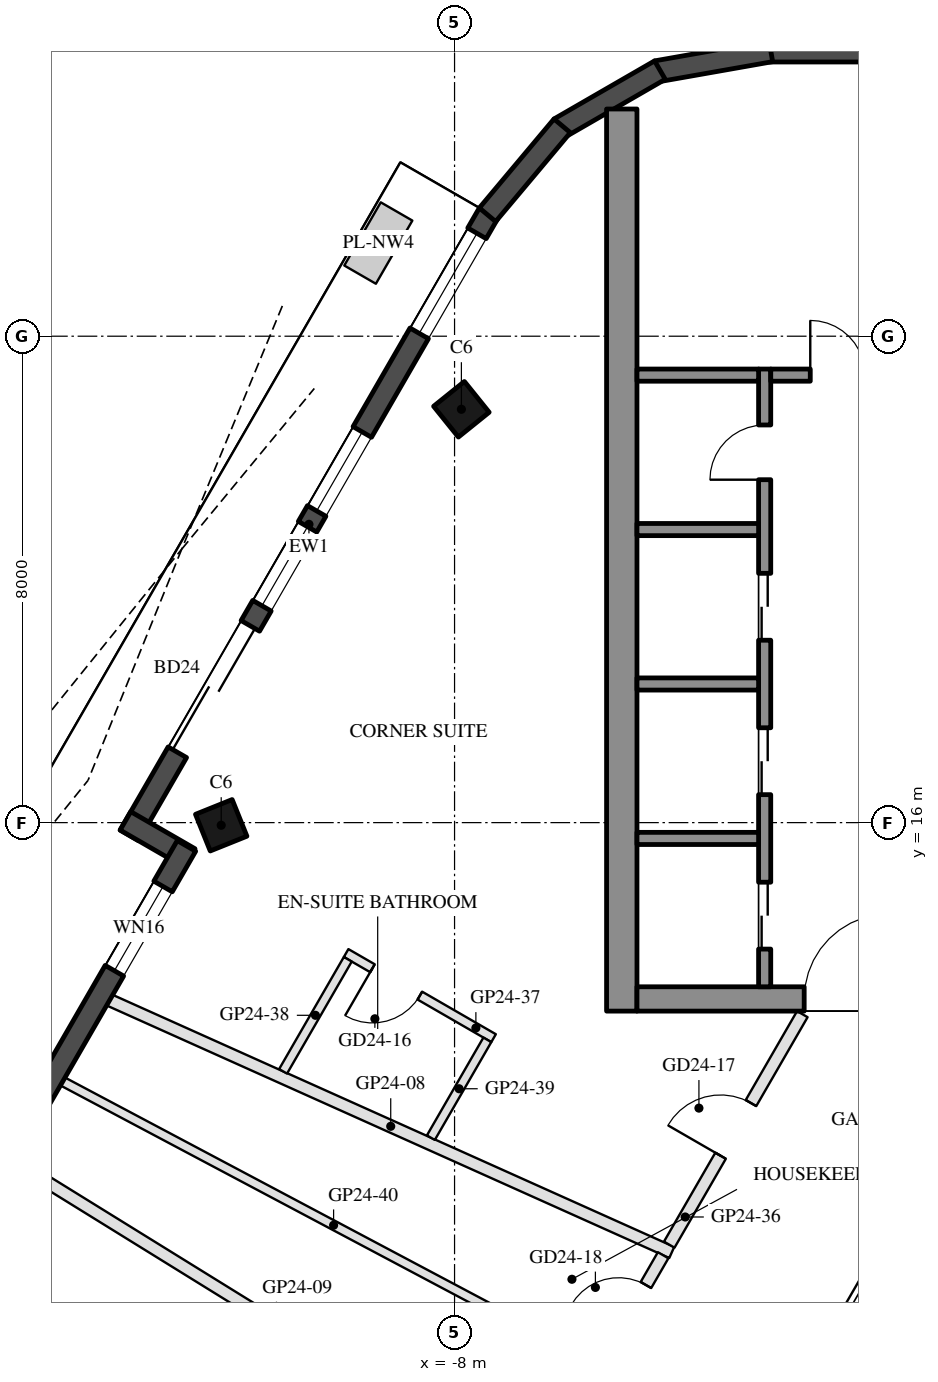
"""IFC4 building model, lengths in metres.
Left out: names, types, materials, properties, quantities, classifications, styles, units other than length and angle.
Written with IfcOpenShell. Run it as: python <this file> out.ifc"""

import sys

from ifc_helpers import new_model, si_unit, direction, frame, frame_2d, origin, origin_2d, place, context, subcontext, project, spatial, rectangle, hollow_rectangle, extrude, boolean, halfspace, element, fill, save


model = new_model("IFC4")
c1 = context("Model", 3, precision=1e-05, world=origin(), true_north=direction((0.0, 1.0)))
c2 = subcontext(c1, "Body", "Model", "MODEL_VIEW")
j1 = project(units=[si_unit("LENGTHUNIT", "METRE"), si_unit("PLANEANGLEUNIT", "RADIAN")], contexts=[c1])
p1 = place(None, origin())
s1 = spatial("IfcSite", under=j1, at=p1, CompositionType="ELEMENT")
p2 = place(p1, origin())
s2 = spatial("IfcBuilding", under=s1, at=p2, CompositionType="ELEMENT")
p3 = place(p2, frame((0.0, 0.0, 254.1)))
s3 = spatial("IfcBuildingStorey", under=s2, at=p3, CompositionType="ELEMENT", Elevation=254.1)
p4 = place(p3, frame((-7.888, 22.798, 0.0), z_axis=(0.069729210429, -0.17998811977, 0.981194228456), x_axis=(0.504065654675, 0.855141098331, 0.121043453862)))
e1 = element("IfcColumn", 1, at=p4, inside=s3, PredefinedType="COLUMN", context=c2, shape_type="SweptSolid", body=[
    boolean("DIFFERENCE", boolean("DIFFERENCE", extrude(hollow_rectangle(XDim=0.65, YDim=0.65, WallThickness=0.03, at=origin_2d()), origin(), (0.0, 0.0, 1.0), 3.771), halfspace(frame((0.0, 0.0, 0.047), z_axis=(0.0, 0.0, 1.0), x_axis=(1.0, 0.0, 0.0)), True)), halfspace(frame((0.0, 0.0, 3.724), z_axis=(0.0, 0.0, 1.0), x_axis=(1.0, 0.0, 0.0)), False)),
])
p5 = place(p3, frame((-11.838, 15.957, 0.0), z_axis=(0.100518021011, -0.128316722417, 0.98662604172), x_axis=(0.503129383785, 0.862065632243, 0.060857775822)))
e2 = element("IfcColumn", 2, at=p5, inside=s3, PredefinedType="COLUMN", context=c2, shape_type="SweptSolid", body=[
    boolean("DIFFERENCE", boolean("DIFFERENCE", extrude(hollow_rectangle(XDim=0.65, YDim=0.65, WallThickness=0.03, at=origin_2d()), origin(), (0.0, 0.0, 1.0), 3.75), halfspace(frame((0.0, 0.0, 0.04), z_axis=(0.0, 0.0, 1.0), x_axis=(1.0, 0.0, 0.0)), True)), halfspace(frame((0.0, 0.0, 3.71), z_axis=(0.0, 0.0, 1.0), x_axis=(1.0, 0.0, 0.0)), False)),
])
p6 = place(p3, frame((-7.441, 26.022, 0.0), z_axis=(0.0, 0.0, 1.0), x_axis=(-0.499992533062, -0.86602971478, 0.0)))
e3 = element("IfcWall", 3, at=p6, inside=s3, PredefinedType="SOLIDWALL", context=c2, shape_type="SweptSolid", body=[
    extrude(rectangle(XDim=11.816, YDim=0.35, at=frame_2d((5.908, 0.0))), origin(), (0.0, 0.0, 1.0), 3.55),
])
p7 = place(p6, frame((0.381, 0.0, 0.3)))
e4 = element("IfcOpeningElement", 4, at=p7, cuts=e3, PredefinedType="OPENING", context=c2, shape_type="SweptSolid", body=[
    extrude(rectangle(XDim=1.9, YDim=2.65, at=frame_2d((0.95, 1.325))), frame((0.0, 0.185, 0.0), z_axis=(0.0, -1.0, 0.0), x_axis=(1.0, 0.0, 0.0)), (0.0, 0.0, 1.0), 0.37),
])
p8 = place(p6, frame((7.836, 0.0, 0.0)))
e5 = element("IfcOpeningElement", 5, at=p8, cuts=e3, PredefinedType="OPENING", context=c2, shape_type="SweptSolid", body=[
    extrude(rectangle(XDim=2.4, YDim=2.4, at=frame_2d((1.2, 1.2))), frame((0.0, 0.185, 0.0), z_axis=(0.0, -1.0, 0.0), x_axis=(1.0, 0.0, 0.0)), (0.0, 0.0, 1.0), 0.37),
])
p9 = place(p6, frame((4.154, 0.0, 0.3)))
e6 = element("IfcOpeningElement", 6, at=p9, cuts=e3, PredefinedType="OPENING", context=c2, shape_type="SweptSolid", body=[
    extrude(rectangle(XDim=1.5, YDim=2.65, at=frame_2d((0.75, 1.325))), frame((0.0, 0.185, 0.0), z_axis=(0.0, -1.0, 0.0), x_axis=(1.0, 0.0, 0.0)), (0.0, 0.0, 1.0), 0.37),
])
p10 = place(p6, frame((5.954, 0.0, 0.3)))
e7 = element("IfcOpeningElement", 7, at=p10, cuts=e3, PredefinedType="OPENING", context=c2, shape_type="SweptSolid", body=[
    extrude(rectangle(XDim=1.5, YDim=2.65, at=frame_2d((0.75, 1.325))), frame((0.0, 0.185, 0.0), z_axis=(0.0, -1.0, 0.0), x_axis=(1.0, 0.0, 0.0)), (0.0, 0.0, 1.0), 0.37),
])
p11 = place(p3, frame((-13.413, 16.029, 0.0), z_axis=(0.0, 0.0, 1.0), x_axis=(0.866005645448, -0.500034220881, 0.0)))
e8 = element("IfcWall", 8, at=p11, inside=s3, PredefinedType="SOLIDWALL", context=c2, shape_type="SweptSolid", body=[
    extrude(rectangle(XDim=1.22, YDim=0.35, at=frame_2d((0.61, 0.0))), origin(), (0.0, 0.0, 1.0), 3.55),
])
p12 = place(p3, frame((-12.409, 15.617, 0.0), z_axis=(0.0, 0.0, 1.0), x_axis=(-0.500003597184, -0.866023326939, 0.0)))
e9 = element("IfcWall", 9, at=p12, inside=s3, PredefinedType="SOLIDWALL", context=c2, shape_type="SweptSolid", body=[
    extrude(rectangle(XDim=6.74, YDim=0.35, at=frame_2d((3.37, 0.0))), origin(), (0.0, 0.0, 1.0), 3.55),
])
p13 = place(p12, frame((0.77, 0.0, 0.3)))
e10 = element("IfcOpeningElement", 10, at=p13, cuts=e9, PredefinedType="OPENING", context=c2, shape_type="SweptSolid", body=[
    extrude(rectangle(XDim=1.6, YDim=2.65, at=frame_2d((0.8, 1.325))), frame((0.0, 0.185, 0.0), z_axis=(0.0, -1.0, 0.0), x_axis=(1.0, 0.0, 0.0)), (0.0, 0.0, 1.0), 0.37),
])
p14 = place(p3, frame((2.829, 28.685, 0.0), z_axis=(0.0, 0.0, 1.0), x_axis=(-1.0, 0.0, 0.0)))
e11 = element("IfcWall", 11, at=p14, inside=s3, PredefinedType="SOLIDWALL", context=c2, shape_type="SweptSolid", body=[
    extrude(rectangle(XDim=5.658, YDim=0.35, at=frame_2d((2.829, 0.0))), origin(), (0.0, 0.0, 1.0), 3.55),
])
for number, where, z_axis, x_axis in (
    (12, (-2.799, 28.688, 0.0), (0.0, 0.0, 1.0), (-0.985, -0.174, 0.0)),
    (13, (-4.623, 28.377, 0.0), (0.0, 0.0, 1.0), (-0.866, -0.5, 0.0)),
):
    element("IfcWall", number, at=place(p3, frame(where, z_axis=z_axis, x_axis=x_axis)), inside=s3, PredefinedType="SOLIDWALL", context=c2, shape_type="SweptSolid", body=[
        extrude(rectangle(XDim=1.91, YDim=0.35, at=frame_2d((0.955, 0.0))), origin(), (0.0, 0.0, 1.0), 3.55),
    ])
p15 = place(p3, frame((-6.23, 27.461, 0.0), z_axis=(0.0, 0.0, 1.0), x_axis=(-0.642808304945, -0.766027077259, 0.0)))
e14 = element("IfcWall", 14, at=p15, inside=s3, PredefinedType="SOLIDWALL", context=c2, shape_type="SweptSolid", body=[
    extrude(rectangle(XDim=1.91, YDim=0.35, at=frame_2d((0.955, 0.0))), origin(), (0.0, 0.0, 1.0), 3.55),
])
p16 = place(p3, frame((-5.25, 12.9, 0.0), z_axis=(0.0, 0.0, 1.0), x_axis=(0.0, 1.0, 0.0)))
e15 = element("IfcWall", 15, at=p16, inside=s3, PredefinedType="SHEAR", context=c2, shape_type="SweptSolid", body=[
    extrude(rectangle(XDim=14.837, YDim=0.5, at=frame_2d((7.418, 0.0))), origin(), (0.0, 0.0, 1.0), 3.5),
])
p17 = place(p3, frame((5.0, 13.1, 0.0), z_axis=(0.0, 0.0, 1.0), x_axis=(-1.0, 0.0, 0.0)))
e16 = element("IfcWall", 16, at=p17, inside=s3, PredefinedType="SHEAR", context=c2, shape_type="SweptSolid", body=[
    extrude(rectangle(XDim=10.0, YDim=0.4, at=frame_2d((5.0, 0.0))), origin(), (0.0, 0.0, 1.0), 3.5),
])
p18 = place(p17, frame((3.55, 0.0, 0.0)))
e17 = element("IfcOpeningElement", 17, at=p18, cuts=e16, PredefinedType="OPENING", context=c2, shape_type="SweptSolid", body=[
    extrude(rectangle(XDim=1.1, YDim=2.1, at=frame_2d((0.55, 1.05))), frame((0.0, 0.21, 0.0), z_axis=(0.0, -1.0, 0.0), x_axis=(1.0, 0.0, 0.0)), (0.0, 0.0, 1.0), 0.42),
])
p19 = place(p17, frame((5.85, 0.0, 0.0)))
e18 = element("IfcOpeningElement", 18, at=p19, cuts=e16, PredefinedType="OPENING", context=c2, shape_type="SweptSolid", body=[
    extrude(rectangle(XDim=1.4, YDim=2.1, at=frame_2d((0.7, 1.05))), frame((0.0, 0.21, 0.0), z_axis=(0.0, -1.0, 0.0), x_axis=(1.0, 0.0, 0.0)), (0.0, 0.0, 1.0), 0.42),
])
p20 = place(p3, frame((-2.9, 13.3, 0.0), z_axis=(0.0, 0.0, 1.0), x_axis=(0.0, 1.0, 0.0)))
e19 = element("IfcWall", 19, at=p20, inside=s3, PredefinedType="SHEAR", context=c2, shape_type="SweptSolid", body=[
    extrude(rectangle(XDim=10.16, YDim=0.2, at=frame_2d((5.08, 0.0))), origin(), (0.0, 0.0, 1.0), 3.5),
])
p21 = place(p20, frame((0.62, 0.0, 0.0)))
e20 = element("IfcOpeningElement", 20, at=p21, cuts=e19, PredefinedType="OPENING", context=c2, shape_type="SweptSolid", body=[
    extrude(rectangle(XDim=1.1, YDim=2.1, at=frame_2d((0.55, 1.05))), frame((0.0, 0.11, 0.0), z_axis=(0.0, -1.0, 0.0), x_axis=(1.0, 0.0, 0.0)), (0.0, 0.0, 1.0), 0.22),
])
p22 = place(p20, frame((3.16, 0.0, 0.0)))
e21 = element("IfcOpeningElement", 21, at=p22, cuts=e19, PredefinedType="OPENING", context=c2, shape_type="SweptSolid", body=[
    extrude(rectangle(XDim=1.1, YDim=2.1, at=frame_2d((0.55, 1.05))), frame((0.0, 0.11, 0.0), z_axis=(0.0, -1.0, 0.0), x_axis=(1.0, 0.0, 0.0)), (0.0, 0.0, 1.0), 0.22),
])
p23 = place(p20, frame((5.7, 0.0, 0.0)))
e22 = element("IfcOpeningElement", 22, at=p23, cuts=e19, PredefinedType="OPENING", context=c2, shape_type="SweptSolid", body=[
    extrude(rectangle(XDim=1.1, YDim=2.1, at=frame_2d((0.55, 1.05))), frame((0.0, 0.11, 0.0), z_axis=(0.0, -1.0, 0.0), x_axis=(1.0, 0.0, 0.0)), (0.0, 0.0, 1.0), 0.22),
])
p24 = place(p20, frame((8.34, 0.0, 0.0)))
e23 = element("IfcOpeningElement", 23, at=p24, cuts=e19, PredefinedType="OPENING", context=c2, shape_type="SweptSolid", body=[
    extrude(rectangle(XDim=0.9, YDim=2.1, at=frame_2d((0.45, 1.05))), frame((0.0, 0.11, 0.0), z_axis=(0.0, -1.0, 0.0), x_axis=(1.0, 0.0, 0.0)), (0.0, 0.0, 1.0), 0.22),
])
p25 = place(p3, frame((-0.4, 23.36, 0.0), z_axis=(0.0, 0.0, 1.0), x_axis=(-1.0, 0.0, 0.0)))
e24 = element("IfcWall", 24, at=p25, inside=s3, PredefinedType="SHEAR", context=c2, shape_type="SweptSolid", body=[
    extrude(rectangle(XDim=2.4, YDim=0.2, at=frame_2d((1.2, 0.0))), origin(), (0.0, 0.0, 1.0), 3.5),
])
p26 = place(p25, frame((0.85, 0.0, 0.0)))
e25 = element("IfcOpeningElement", 25, at=p26, cuts=e24, PredefinedType="OPENING", context=c2, shape_type="SweptSolid", body=[
    extrude(rectangle(XDim=0.9, YDim=2.1, at=frame_2d((0.45, 1.05))), frame((0.0, 0.11, 0.0), z_axis=(0.0, -1.0, 0.0), x_axis=(1.0, 0.0, 0.0)), (0.0, 0.0, 1.0), 0.22),
])
for number, where, z_axis, x_axis in (
    (26, (-3.0, 15.74, 0.0), (0.0, 0.0, 1.0), (-1.0, 0.0, 0.0)),
    (27, (-3.0, 18.28, 0.0), (0.0, 0.0, 1.0), (-1.0, 0.0, 0.0)),
    (28, (-3.0, 20.82, 0.0), (0.0, 0.0, 1.0), (-1.0, 0.0, 0.0)),
    (29, (-3.0, 23.36, 0.0), (0.0, 0.0, 1.0), (-1.0, 0.0, 0.0)),
):
    element("IfcWall", number, at=place(p3, frame(where, z_axis=z_axis, x_axis=x_axis)), inside=s3, PredefinedType="SHEAR", context=c2, shape_type="SweptSolid", body=[
        extrude(rectangle(XDim=2.0, YDim=0.2, at=frame_2d((1.0, 0.0))), origin(), (0.0, 0.0, 1.0), 3.5),
    ])
p27 = place(p3, frame((-13.672, 13.08, 0.0), z_axis=(0.0, 0.0, 1.0), x_axis=(0.912311972773, -0.409495866077, 0.0)))
e30 = element("IfcWall", 30, at=p27, inside=s3, PredefinedType="PARTITIONING", context=c2, shape_type="SweptSolid", body=[
    extrude(rectangle(XDim=10.132, YDim=0.2, at=frame_2d((5.066, 0.0))), origin(), (0.0, 0.0, 1.0), 3.1),
])
p28 = place(p3, frame((-15.216, 10.405, 0.0), z_axis=(0.0, 0.0, 1.0), x_axis=(0.85032395783, -0.52625960014, 0.0)))
e31 = element("IfcWall", 31, at=p28, inside=s3, PredefinedType="PARTITIONING", context=c2, shape_type="SweptSolid", body=[
    extrude(rectangle(XDim=10.085, YDim=0.2, at=frame_2d((5.042, 0.0))), origin(), (0.0, 0.0, 1.0), 3.1),
])
p29 = place(p3, frame((-4.469, 9.059, 0.0), z_axis=(0.0, 0.0, 1.0), x_axis=(0.499996027077, 0.86602769754, 0.0)))
e32 = element("IfcWall", 32, at=p29, inside=s3, PredefinedType="PARTITIONING", context=c2, shape_type="SweptSolid", body=[
    extrude(rectangle(XDim=4.377, YDim=0.2, at=frame_2d((2.189, 0.0))), origin(), (0.0, 0.0, 1.0), 3.0),
])
p30 = place(p29, frame((1.689, 0.0, 0.0)))
e33 = element("IfcOpeningElement", 33, at=p30, cuts=e32, PredefinedType="OPENING", context=c2, shape_type="SweptSolid", body=[
    extrude(rectangle(XDim=1.0, YDim=2.1, at=frame_2d((0.5, 1.05))), frame((0.0, 0.11, 0.0), z_axis=(0.0, -1.0, 0.0), x_axis=(1.0, 0.0, 0.0)), (0.0, 0.0, 1.0), 0.22),
])
p31 = place(p3, frame((-7.358, 12.455, 0.0), z_axis=(0.0, 0.0, 1.0), x_axis=(-0.866034573852, 0.49998411664, 0.0)))
e34 = element("IfcWall", 34, at=p31, inside=s3, PredefinedType="PARTITIONING", context=c2, shape_type="SweptSolid", body=[
    extrude(rectangle(XDim=2.8, YDim=0.15, at=frame_2d((1.4, 0.0))), origin(), (0.0, 0.0, 1.0), 3.55),
])
p32 = place(p31, frame((1.4, 0.0, 0.0)))
e35 = element("IfcOpeningElement", 35, at=p32, cuts=e34, PredefinedType="OPENING", context=c2, shape_type="SweptSolid", body=[
    extrude(rectangle(XDim=0.9, YDim=2.1, at=frame_2d((0.45, 1.05))), frame((0.0, 0.085, 0.0), z_axis=(0.0, -1.0, 0.0), x_axis=(1.0, 0.0, 0.0)), (0.0, 0.0, 1.0), 0.17),
])
p33 = place(p3, frame((-9.756, 13.752, 0.0), z_axis=(0.0, 0.0, 1.0), x_axis=(-0.50001378257, -0.866017446268, 0.0)))
e36 = element("IfcWall", 36, at=p33, inside=s3, PredefinedType="PARTITIONING", context=c2, shape_type="SweptSolid", body=[
    extrude(rectangle(XDim=2.128, YDim=0.15, at=frame_2d((1.064, 0.0))), origin(), (0.0, 0.0, 1.0), 3.55),
])
p34 = place(p3, frame((-7.461, 12.427, 0.0), z_axis=(0.0, 0.0, 1.0), x_axis=(-0.500025795397, -0.866010510293, 0.0)))
e37 = element("IfcWall", 37, at=p34, inside=s3, PredefinedType="PARTITIONING", context=c2, shape_type="SweptSolid", body=[
    extrude(rectangle(XDim=1.858, YDim=0.15, at=frame_2d((0.929, 0.0))), origin(), (0.0, 0.0, 1.0), 3.55),
])
p35 = place(p3, frame((-14.444, 11.742, 0.0), z_axis=(0.0, 0.0, 1.0), x_axis=(0.88333061271, -0.468750497225, 0.0)))
e38 = element("IfcWall", 38, at=p35, inside=s3, PredefinedType="PARTITIONING", context=c2, shape_type="SweptSolid", body=[
    extrude(rectangle(XDim=10.086, YDim=0.15, at=frame_2d((5.043, 0.0))), origin(), (0.0, 0.0, 1.0), 3.1),
])
p36 = place(p3, frame((-5.585, 7.126, 0.0), z_axis=(0.0, 0.0, 1.0), x_axis=(0.499927092639, 0.866067492777, 0.0)))
e39 = element("IfcWall", 39, at=p36, inside=s3, PredefinedType="PARTITIONING", context=c2, shape_type="SweptSolid", body=[
    extrude(rectangle(XDim=2.031, YDim=0.2, at=frame_2d((1.016, 0.0))), origin(), (0.0, 0.0, 1.0), 3.0),
])
p37 = place(p36, frame((0.566, 0.0, 0.0)))
e40 = element("IfcOpeningElement", 40, at=p37, cuts=e39, PredefinedType="OPENING", context=c2, shape_type="SweptSolid", body=[
    extrude(rectangle(XDim=0.9, YDim=2.1, at=frame_2d((0.45, 1.05))), frame((0.0, 0.11, 0.0), z_axis=(0.0, -1.0, 0.0), x_axis=(1.0, 0.0, 0.0)), (0.0, 0.0, 1.0), 0.22),
])
p38 = place(p7, origin())
e41 = element("IfcWindow", 41, at=p38, inside=s3, PartitioningType="SINGLE_PANEL", PredefinedType="WINDOW", context=c2, shape_type="SweptSolid", body=[
    extrude(rectangle(XDim=1.9, YDim=2.65, at=frame_2d((0.95, 1.325))), frame((0.0, 0.03, 0.0), z_axis=(0.0, -1.0, 0.0), x_axis=(1.0, 0.0, 0.0)), (0.0, 0.0, 1.0), 0.06),
])
fill(e4, e41)
p39 = place(p8, frame((2.4, 0.0, 0.0), z_axis=(0.0, 0.0, 1.0), x_axis=(-1.0, 0.0, 0.0)))
e42 = element("IfcDoor", 42, at=p39, inside=s3, OperationType="SLIDING_TO_LEFT", PredefinedType="DOOR", context=c2, shape_type="SweptSolid", body=[
    extrude(rectangle(XDim=2.4, YDim=2.4, at=frame_2d((1.2, 1.2))), frame((0.0, 0.025, 0.0), z_axis=(0.0, -1.0, 0.0), x_axis=(1.0, 0.0, 0.0)), (0.0, 0.0, 1.0), 0.05),
])
fill(e5, e42)
p40 = place(p9, origin())
e43 = element("IfcWindow", 43, at=p40, inside=s3, PartitioningType="SINGLE_PANEL", PredefinedType="WINDOW", context=c2, shape_type="SweptSolid", body=[
    extrude(rectangle(XDim=1.5, YDim=2.65, at=frame_2d((0.75, 1.325))), frame((0.0, 0.03, 0.0), z_axis=(0.0, -1.0, 0.0), x_axis=(1.0, 0.0, 0.0)), (0.0, 0.0, 1.0), 0.06),
])
fill(e6, e43)
p41 = place(p10, origin())
e44 = element("IfcWindow", 44, at=p41, inside=s3, PartitioningType="SINGLE_PANEL", PredefinedType="WINDOW", context=c2, shape_type="SweptSolid", body=[
    extrude(rectangle(XDim=1.5, YDim=2.65, at=frame_2d((0.75, 1.325))), frame((0.0, 0.03, 0.0), z_axis=(0.0, -1.0, 0.0), x_axis=(1.0, 0.0, 0.0)), (0.0, 0.0, 1.0), 0.06),
])
fill(e7, e44)
p42 = place(p13, origin())
e45 = element("IfcWindow", 45, at=p42, inside=s3, PartitioningType="SINGLE_PANEL", PredefinedType="WINDOW", context=c2, shape_type="SweptSolid", body=[
    extrude(rectangle(XDim=1.6, YDim=2.65, at=frame_2d((0.8, 1.325))), frame((0.0, 0.03, 0.0), z_axis=(0.0, -1.0, 0.0), x_axis=(1.0, 0.0, 0.0)), (0.0, 0.0, 1.0), 0.06),
])
fill(e10, e45)
p43 = place(p21, origin())
e46 = element("IfcDoor", 46, at=p43, inside=s3, OperationType="DOUBLE_DOOR_SLIDING", PredefinedType="DOOR", context=c2, shape_type="SweptSolid", body=[
    extrude(rectangle(XDim=1.1, YDim=2.1, at=frame_2d((0.55, 1.05))), frame((0.0, 0.025, 0.0), z_axis=(0.0, -1.0, 0.0), x_axis=(1.0, 0.0, 0.0)), (0.0, 0.0, 1.0), 0.05),
])
fill(e20, e46)
p44 = place(p22, origin())
e47 = element("IfcDoor", 47, at=p44, inside=s3, OperationType="DOUBLE_DOOR_SLIDING", PredefinedType="DOOR", context=c2, shape_type="SweptSolid", body=[
    extrude(rectangle(XDim=1.1, YDim=2.1, at=frame_2d((0.55, 1.05))), frame((0.0, 0.025, 0.0), z_axis=(0.0, -1.0, 0.0), x_axis=(1.0, 0.0, 0.0)), (0.0, 0.0, 1.0), 0.05),
])
fill(e21, e47)
p45 = place(p23, origin())
e48 = element("IfcDoor", 48, at=p45, inside=s3, OperationType="DOUBLE_DOOR_SLIDING", PredefinedType="DOOR", context=c2, shape_type="SweptSolid", body=[
    extrude(rectangle(XDim=1.1, YDim=2.1, at=frame_2d((0.55, 1.05))), frame((0.0, 0.025, 0.0), z_axis=(0.0, -1.0, 0.0), x_axis=(1.0, 0.0, 0.0)), (0.0, 0.0, 1.0), 0.05),
])
fill(e22, e48)
p46 = place(p24, origin())
e49 = element("IfcDoor", 49, at=p46, inside=s3, OperationType="SINGLE_SWING_LEFT", PredefinedType="DOOR", context=c2, shape_type="SweptSolid", body=[
    extrude(rectangle(XDim=0.9, YDim=2.1, at=frame_2d((0.45, 1.05))), frame((0.0, 0.025, 0.0), z_axis=(0.0, -1.0, 0.0), x_axis=(1.0, 0.0, 0.0)), (0.0, 0.0, 1.0), 0.05),
])
fill(e23, e49)
p47 = place(p26, frame((0.9, 0.0, 0.0), z_axis=(0.0, 0.0, 1.0), x_axis=(-1.0, 0.0, 0.0)))
e50 = element("IfcDoor", 50, at=p47, inside=s3, OperationType="SINGLE_SWING_LEFT", PredefinedType="DOOR", context=c2, shape_type="SweptSolid", body=[
    extrude(rectangle(XDim=0.9, YDim=2.1, at=frame_2d((0.45, 1.05))), frame((0.0, 0.025, 0.0), z_axis=(0.0, -1.0, 0.0), x_axis=(1.0, 0.0, 0.0)), (0.0, 0.0, 1.0), 0.05),
])
fill(e25, e50)
p48 = place(p19, frame((1.4, 0.0, 0.0), z_axis=(0.0, 0.0, 1.0), x_axis=(-1.0, 0.0, 0.0)))
e51 = element("IfcDoor", 51, at=p48, inside=s3, OperationType="DOUBLE_DOOR_SINGLE_SWING", PredefinedType="DOOR", context=c2, shape_type="SweptSolid", body=[
    extrude(rectangle(XDim=1.4, YDim=2.1, at=frame_2d((0.7, 1.05))), frame((0.0, 0.025, 0.0), z_axis=(0.0, -1.0, 0.0), x_axis=(1.0, 0.0, 0.0)), (0.0, 0.0, 1.0), 0.05),
])
fill(e18, e51)
p49 = place(p32, origin())
e52 = element("IfcDoor", 52, at=p49, inside=s3, OperationType="SINGLE_SWING_RIGHT", PredefinedType="DOOR", context=c2, shape_type="SweptSolid", body=[
    extrude(rectangle(XDim=0.9, YDim=2.1, at=frame_2d((0.45, 1.05))), frame((0.0, 0.025, 0.0), z_axis=(0.0, -1.0, 0.0), x_axis=(1.0, 0.0, 0.0)), (0.0, 0.0, 1.0), 0.05),
])
fill(e35, e52)
p50 = place(p30, origin())
e53 = element("IfcDoor", 53, at=p50, inside=s3, OperationType="SINGLE_SWING_LEFT", PredefinedType="DOOR", context=c2, shape_type="SweptSolid", body=[
    extrude(rectangle(XDim=1.0, YDim=2.1, at=frame_2d((0.5, 1.05))), frame((0.0, 0.025, 0.0), z_axis=(0.0, -1.0, 0.0), x_axis=(1.0, 0.0, 0.0)), (0.0, 0.0, 1.0), 0.05),
])
fill(e33, e53)
p51 = place(p37, origin())
e54 = element("IfcDoor", 54, at=p51, inside=s3, OperationType="SINGLE_SWING_LEFT", PredefinedType="DOOR", context=c2, shape_type="SweptSolid", body=[
    extrude(rectangle(XDim=0.9, YDim=2.1, at=frame_2d((0.45, 1.05))), frame((0.0, 0.025, 0.0), z_axis=(0.0, -1.0, 0.0), x_axis=(1.0, 0.0, 0.0)), (0.0, 0.0, 1.0), 0.05),
])
fill(e40, e54)
save(model, sys.argv[1])
